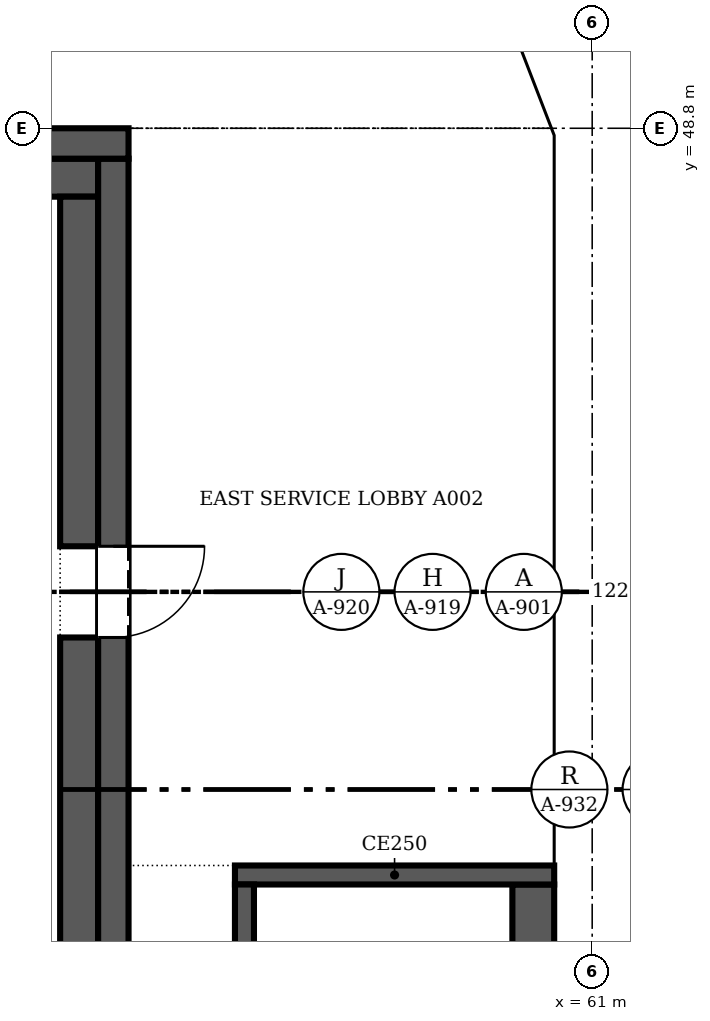
"""IFC4 building model, lengths in metres.
Left out: names, types, materials, properties, quantities, classifications, styles, units other than length and angle.
Written with IfcOpenShell. Run it as: python <this file> out.ifc"""

import sys

from ifc_helpers import new_model, si_unit, direction, frame, frame_2d, origin, place, context, subcontext, project, spatial, polyline, rectangle, outline, extrude, faceted_brep, source, transform, mapped, element, fill, save


model = new_model("IFC4")
c1 = context("Model", 3, precision=1e-05, world=origin(), true_north=direction((0.0, 1.0)))
c2 = subcontext(c1, "Body", "Model", "MODEL_VIEW")
j1 = project(units=[si_unit("LENGTHUNIT", "METRE"), si_unit("PLANEANGLEUNIT", "RADIAN")], contexts=[c1])
p1 = place(None, origin())
s1 = spatial("IfcSite", under=j1, at=p1, CompositionType="ELEMENT")
p2 = place(p1, origin())
s2 = spatial("IfcBuilding", under=s1, at=p2, CompositionType="ELEMENT")
p3 = place(p2, frame((0.0, 0.0, 252.1)))
s3 = spatial("IfcBuildingStorey", under=s2, at=p3, CompositionType="ELEMENT", Elevation=252.1)
m1 = source(origin(), c2, "Body", "Brep", [
    faceted_brep([(3.05, -0.25, 0.0), (6.1, -0.25, 3.8), (6.1, -0.25, 3.8), (3.05, -0.25, 7.6), (0.0, -0.25, 3.8), (0.0, 0.25, 3.8), (3.05, 0.25, 7.6), (6.1, 0.25, 3.8), (6.1, 0.25, 3.8), (3.05, 0.25, 0.0)], [[[0, 1, 2, 3, 4]], [[5, 6, 7, 8, 9]], [[9, 8, 1, 0]], [[7, 6, 3, 2]], [[6, 5, 4, 3]], [[5, 9, 0, 4]], [[1, 8, 7, 2]]]),
])
p4 = place(p3, frame((60.75, 36.6, -3.8), z_axis=(0.0, 0.0, 1.0), x_axis=(0.0, 1.0, 0.0)))
e1 = element("IfcWall", 1, at=p4, inside=s3, PredefinedType="SOLIDWALL", context=c2, shape_type="MappedRepresentation", body=[
    mapped(m1, transform((0.0, 0.0, 0.0), scale=1.0)),
])
m2 = source(origin(), c2, "Body", "SweptSolid", [
    extrude(outline(polyline([(3.05, 0.399), (5.78, 3.8), (3.05, 7.2), (0.321, 3.8), (3.05, 0.399)])), frame((0.0, 0.26, 0.0), z_axis=(0.0, -1.0, 0.0), x_axis=(1.0, 0.0, 0.0)), (0.0, 0.0, 1.0), 0.52),
])
p5 = place(p4, origin())
e2 = element("IfcOpeningElement", 2, at=p5, cuts=e1, PredefinedType="OPENING", context=c2, shape_type="MappedRepresentation", body=[
    mapped(m2, transform((0.0, 0.0, 0.0), scale=1.0)),
])
m3 = source(origin(), c2, "Body", "Brep", [
    faceted_brep([(3.05, -0.25, 0.0), (6.053, -0.25, 3.8), (3.05, -0.25, 7.6), (0.0, -0.25, 3.8), (0.0, 0.25, 3.8), (3.05, 0.25, 7.6), (6.007, 0.25, 3.859), (6.007, 0.25, 3.741), (3.05, 0.25, 0.0), (6.053, 0.0, 3.8)], [[[0, 1, 2, 3]], [[4, 5, 6, 7, 8]], [[8, 7, 9, 1, 0]], [[6, 5, 2, 1, 9]], [[5, 4, 3, 2]], [[4, 8, 0, 3]], [[7, 6, 9]]]),
])
p6 = place(p3, frame((60.75, 42.7, -3.8), z_axis=(0.0, 0.0, 1.0), x_axis=(0.0, 1.0, 0.0)))
e3 = element("IfcWall", 3, at=p6, inside=s3, PredefinedType="SOLIDWALL", context=c2, shape_type="MappedRepresentation", body=[
    mapped(m3, transform((0.0, 0.0, 0.0), scale=1.0)),
])
m4 = source(origin(), c2, "Body", "SweptSolid", [
    extrude(outline(polyline([(3.049, 0.401), (5.735, 3.8), (3.049, 7.199), (0.321, 3.8), (3.049, 0.401)])), frame((0.0, 0.26, 0.0), z_axis=(0.0, -1.0, 0.0), x_axis=(1.0, 0.0, 0.0)), (0.0, 0.0, 1.0), 0.52),
])
p7 = place(p6, origin())
e4 = element("IfcOpeningElement", 4, at=p7, cuts=e3, PredefinedType="OPENING", context=c2, shape_type="MappedRepresentation", body=[
    mapped(m4, transform((0.0, 0.0, 0.0), scale=1.0)),
])
m5 = source(origin(), c2, "Body", "Brep", [
    faceted_brep([(2.95, -0.25, 0.0), (3.003, -0.25, 0.068), (3.003, -0.25, 7.531), (2.95, -0.25, 7.6), (0.0, -0.25, 3.8), (0.047, 0.25, 3.86), (2.898, 0.25, 7.532), (2.898, 0.25, 0.068), (0.047, 0.25, 3.74), (2.95, 0.0, 0.0), (2.95, 0.0, 7.6), (0.0, 0.0, 3.8)], [[[0, 1, 2, 3, 4]], [[5, 6, 7, 8]], [[1, 0, 9]], [[10, 3, 2]], [[6, 5, 11, 4, 3, 10]], [[8, 7, 9, 0, 4, 11]], [[8, 11, 5]], [[1, 9, 7, 6, 10, 2]]]),
])
p8 = place(p3, frame((60.75, 48.753, -3.8), z_axis=(0.0, 0.0, 1.0), x_axis=(-0.35992665181, 0.932980602862, 0.0)))
e5 = element("IfcWall", 5, at=p8, inside=s3, PredefinedType="SOLIDWALL", context=c2, shape_type="MappedRepresentation", body=[
    mapped(m5, transform((0.0, 0.0, 0.0), scale=1.0)),
])
m6 = source(origin(), c2, "Body", "SweptSolid", [
    extrude(outline(polyline([(2.75, 6.935), (0.316, 3.8), (2.75, 0.665), (2.75, 6.935)])), frame((0.0, 0.26, 0.0), z_axis=(0.0, -1.0, 0.0), x_axis=(1.0, 0.0, 0.0)), (0.0, 0.0, 1.0), 0.52),
])
p9 = place(p8, origin())
e6 = element("IfcOpeningElement", 6, at=p9, cuts=e5, PredefinedType="OPENING", context=c2, shape_type="MappedRepresentation", body=[
    mapped(m6, transform((0.0, 0.0, 0.0), scale=1.0)),
])
p10 = place(p2, frame((0.0, 0.0, 255.9)))
s4 = spatial("IfcBuildingStorey", under=s2, at=p10, CompositionType="ELEMENT", Elevation=255.9)
m7 = source(origin(), c2, "Body", "Brep", [
    faceted_brep([(3.05, -0.25, 0.0), (6.1, -0.25, 3.8), (6.1, -0.25, 3.8), (3.05, -0.25, 7.6), (0.0, -0.25, 3.8), (0.0, 0.25, 3.8), (3.05, 0.25, 7.6), (6.1, 0.25, 3.8), (6.1, 0.25, 3.8), (3.05, 0.25, 0.0)], [[[0, 1, 2, 3, 4]], [[5, 6, 7, 8, 9]], [[9, 8, 1, 0]], [[7, 6, 3, 2]], [[6, 5, 4, 3]], [[5, 9, 0, 4]], [[1, 8, 7, 2]]]),
])
p11 = place(p10, frame((60.75, 33.55, -3.8), z_axis=(0.0, 0.0, 1.0), x_axis=(0.0, 1.0, 0.0)))
e7 = element("IfcWall", 7, at=p11, inside=s4, PredefinedType="SOLIDWALL", context=c2, shape_type="MappedRepresentation", body=[
    mapped(m7, transform((0.0, 0.0, 0.0), scale=1.0)),
])
m8 = source(origin(), c2, "Body", "SweptSolid", [
    extrude(outline(polyline([(3.05, 0.399), (5.78, 3.8), (3.05, 7.2), (0.321, 3.8), (3.05, 0.399)])), frame((0.0, 0.26, 0.0), z_axis=(0.0, -1.0, 0.0), x_axis=(1.0, 0.0, 0.0)), (0.0, 0.0, 1.0), 0.52),
])
p12 = place(p11, origin())
e8 = element("IfcOpeningElement", 8, at=p12, cuts=e7, PredefinedType="OPENING", context=c2, shape_type="MappedRepresentation", body=[
    mapped(m8, transform((0.0, 0.0, 0.0), scale=1.0)),
])
m9 = source(origin(), c2, "Body", "SweptSolid", [
    extrude(outline(polyline([(3.05, 0.0), (6.1, 3.8), (3.05, 7.6), (0.0, 3.8), (3.05, 0.0)])), frame((0.0, 0.25, 0.0), z_axis=(0.0, -1.0, 0.0), x_axis=(1.0, 0.0, 0.0)), (0.0, 0.0, 1.0), 0.5),
])
p13 = place(p10, frame((60.75, 39.65, -3.8), z_axis=(0.0, 0.0, 1.0), x_axis=(0.0, 1.0, 0.0)))
e9 = element("IfcWall", 9, at=p13, inside=s4, PredefinedType="SOLIDWALL", context=c2, shape_type="MappedRepresentation", body=[
    mapped(m9, transform((0.0, 0.0, 0.0), scale=1.0)),
])
p14 = place(p13, origin())
e10 = element("IfcOpeningElement", 10, at=p14, cuts=e9, PredefinedType="OPENING", context=c2, shape_type="MappedRepresentation", body=[
    mapped(m8, transform((0.0, 0.0, 0.0), scale=1.0)),
])
m10 = source(origin(), c2, "Body", "Brep", [
    faceted_brep([(3.003, -0.25, 0.0), (3.05, -0.25, 0.06), (3.05, -0.25, 7.54), (3.003, -0.25, 7.6), (0.0, -0.25, 3.8), (0.0, 0.25, 3.8), (2.957, 0.25, 7.541), (2.957, 0.25, 0.059), (3.003, 0.0, 0.0), (3.003, 0.0, 7.6)], [[[0, 1, 2, 3, 4]], [[5, 6, 7]], [[1, 0, 8]], [[9, 3, 2]], [[6, 5, 4, 3, 9]], [[5, 7, 8, 0, 4]], [[1, 8, 7, 6, 9, 2]]]),
])
p15 = place(p10, frame((60.75, 45.75, -3.8), z_axis=(0.0, 0.0, 1.0), x_axis=(0.0, 1.0, 0.0)))
e11 = element("IfcWall", 11, at=p15, inside=s4, PredefinedType="SOLIDWALL", context=c2, shape_type="MappedRepresentation", body=[
    mapped(m10, transform((0.0, 0.0, 0.0), scale=1.0)),
])
m11 = source(origin(), c2, "Body", "SweptSolid", [
    extrude(outline(polyline([(2.803, 6.944), (0.319, 3.8), (2.803, 0.656), (2.803, 6.944)])), frame((0.0, 0.26, 0.0), z_axis=(0.0, -1.0, 0.0), x_axis=(1.0, 0.0, 0.0)), (0.0, 0.0, 1.0), 0.52),
])
p16 = place(p15, origin())
e12 = element("IfcOpeningElement", 12, at=p16, cuts=e11, PredefinedType="OPENING", context=c2, shape_type="MappedRepresentation", body=[
    mapped(m11, transform((0.0, 0.0, 0.0), scale=1.0)),
])
m12 = source(origin(), c2, "Body", "Brep", [
    faceted_brep([(0.047, -0.25, 0.0), (2.997, -0.25, 3.8), (0.047, -0.25, 7.6), (0.0, -0.25, 7.541), (0.0, -0.25, 0.059), (0.093, 0.25, 7.54), (2.944, 0.25, 3.868), (2.944, 0.25, 3.732), (0.093, 0.25, 0.06), (2.997, 0.0, 3.8), (0.047, 0.0, 0.0), (0.047, 0.0, 7.6)], [[[0, 1, 2, 3, 4]], [[5, 6, 7, 8]], [[8, 7, 9, 1, 0, 10]], [[6, 5, 11, 2, 1, 9]], [[3, 2, 11]], [[10, 0, 4]], [[8, 10, 4, 3, 11, 5]], [[9, 7, 6]]]),
])
p17 = place(p10, frame((60.767, 48.71, -3.8), z_axis=(0.0, 0.0, 1.0), x_axis=(-0.359901446078, 0.932990326376, 0.0)))
e13 = element("IfcWall", 13, at=p17, inside=s4, PredefinedType="SOLIDWALL", context=c2, shape_type="MappedRepresentation", body=[
    mapped(m12, transform((0.0, 0.0, 0.0), scale=1.0)),
])
m13 = source(origin(), c2, "Body", "SweptSolid", [
    extrude(outline(polyline([(0.247, 0.665), (2.681, 3.8), (0.247, 6.935), (0.247, 0.665)])), frame((0.0, 0.26, 0.0), z_axis=(0.0, -1.0, 0.0), x_axis=(1.0, 0.0, 0.0)), (0.0, 0.0, 1.0), 0.52),
])
p18 = place(p17, origin())
e14 = element("IfcOpeningElement", 14, at=p18, cuts=e13, PredefinedType="OPENING", context=c2, shape_type="MappedRepresentation", body=[
    mapped(m13, transform((0.0, 0.0, 0.0), scale=1.0)),
])
p19 = place(p3, frame((30.5, 48.6, 0.0), z_axis=(0.0, 0.0, 1.0), x_axis=(1.0, 0.0, 0.0)))
e15 = element("IfcWall", 15, at=p19, inside=s3, PredefinedType="SHEAR", context=c2, shape_type="SweptSolid", body=[
    extrude(rectangle(XDim=24.4, YDim=0.4, at=frame_2d((12.2, 0.0))), origin(), (0.0, 0.0, 1.0), 3.8),
])
p20 = place(p3, frame((54.7, 48.4, 0.0), z_axis=(0.0, 0.0, 1.0), x_axis=(0.0, -1.0, 0.0)))
e16 = element("IfcWall", 16, at=p20, inside=s3, PredefinedType="SHEAR", context=c2, shape_type="SweptSolid", body=[
    extrude(rectangle(XDim=23.6, YDim=0.4, at=frame_2d((11.8, 0.0))), origin(), (0.0, 0.0, 1.0), 3.8),
])
m14 = source(origin(), c2, "Body", "SweptSolid", [
    extrude(rectangle(XDim=1.2, YDim=2.1, at=frame_2d((0.6, 1.05))), frame((0.0, 0.21, 0.0), z_axis=(0.0, -1.0, 0.0), x_axis=(1.0, 0.0, 0.0)), (0.0, 0.0, 1.0), 0.42),
])
p21 = place(p20, frame((5.1, 0.0, 0.0)))
e17 = element("IfcOpeningElement", 17, at=p21, cuts=e16, PredefinedType="OPENING", context=c2, shape_type="MappedRepresentation", body=[
    mapped(m14, transform((0.0, 0.0, 0.0), scale=1.0)),
])
p22 = place(p3, frame((30.9, 48.15, 0.0), z_axis=(0.0, 0.0, 1.0), x_axis=(1.0, 0.0, 0.0)))
e18 = element("IfcWall", 18, at=p22, inside=s3, PredefinedType="SOLIDWALL", context=c2, shape_type="SweptSolid", body=[
    extrude(rectangle(XDim=23.6, YDim=0.5, at=frame_2d((11.8, 0.0))), origin(), (0.0, 0.0, 1.0), 3.8),
])
p23 = place(p3, frame((54.25, 36.88, 0.0), z_axis=(0.0, 0.0, 1.0), x_axis=(0.0, 1.0, 0.0)))
e19 = element("IfcWall", 19, at=p23, inside=s3, PredefinedType="SOLIDWALL", context=c2, shape_type="SweptSolid", body=[
    extrude(rectangle(XDim=5.22, YDim=0.5, at=frame_2d((2.61, 0.0))), origin(), (0.0, 0.0, 1.0), 3.8),
])
p24 = place(p3, frame((54.25, 43.3, 0.0), z_axis=(0.0, 0.0, 1.0), x_axis=(0.0, 1.0, 0.0)))
e20 = element("IfcWall", 20, at=p24, inside=s3, PredefinedType="SOLIDWALL", context=c2, shape_type="SweptSolid", body=[
    extrude(rectangle(XDim=4.6, YDim=0.5, at=frame_2d((2.3, 0.0))), origin(), (0.0, 0.0, 1.0), 3.8),
])
p25 = place(p3, frame((56.425, 30.85, 0.0), z_axis=(0.0, 0.0, 1.0), x_axis=(0.0, 1.0, 0.0)))
e21 = element("IfcWall", 21, at=p25, inside=s3, PredefinedType="SOLIDWALL", context=c2, shape_type="SweptSolid", body=[
    extrude(rectangle(XDim=8.0, YDim=0.25, at=frame_2d((4.0, 0.0))), origin(), (0.0, 0.0, 1.0), 3.8),
])
p26 = place(p3, frame((56.3, 38.975, 0.0), z_axis=(0.0, 0.0, 1.0), x_axis=(1.0, 0.0, 0.0)))
e22 = element("IfcWall", 22, at=p26, inside=s3, PredefinedType="SOLIDWALL", context=c2, shape_type="SweptSolid", body=[
    extrude(rectangle(XDim=4.2, YDim=0.25, at=frame_2d((2.1, 0.0))), origin(), (0.0, 0.0, 1.0), 3.8),
])
p27 = place(p3, frame((60.225, 38.85, 0.0), z_axis=(0.0, 0.0, 1.0), x_axis=(0.0, -1.0, 0.0)))
e23 = element("IfcWall", 23, at=p27, inside=s3, PredefinedType="SOLIDWALL", context=c2, shape_type="SweptSolid", body=[
    extrude(rectangle(XDim=8.0, YDim=0.55, at=frame_2d((4.0, 0.0))), origin(), (0.0, 0.0, 1.0), 3.8),
])
m15 = source(origin(), c2, "Body", "SweptSolid", [
    extrude(rectangle(XDim=1.2, YDim=2.1, at=frame_2d((0.6, 1.05))), frame((0.0, 0.025, 0.0), z_axis=(0.0, -1.0, 0.0), x_axis=(1.0, 0.0, 0.0)), (0.0, 0.0, 1.0), 0.05),
])
p28 = place(p21, origin())
e24 = element("IfcDoor", 24, at=p28, inside=s3, OperationType="SINGLE_SWING_LEFT", PredefinedType="DOOR", context=c2, shape_type="MappedRepresentation", body=[
    mapped(m15, transform((0.0, 0.0, 0.0), scale=1.0)),
])
fill(e17, e24)
save(model, sys.argv[1])
